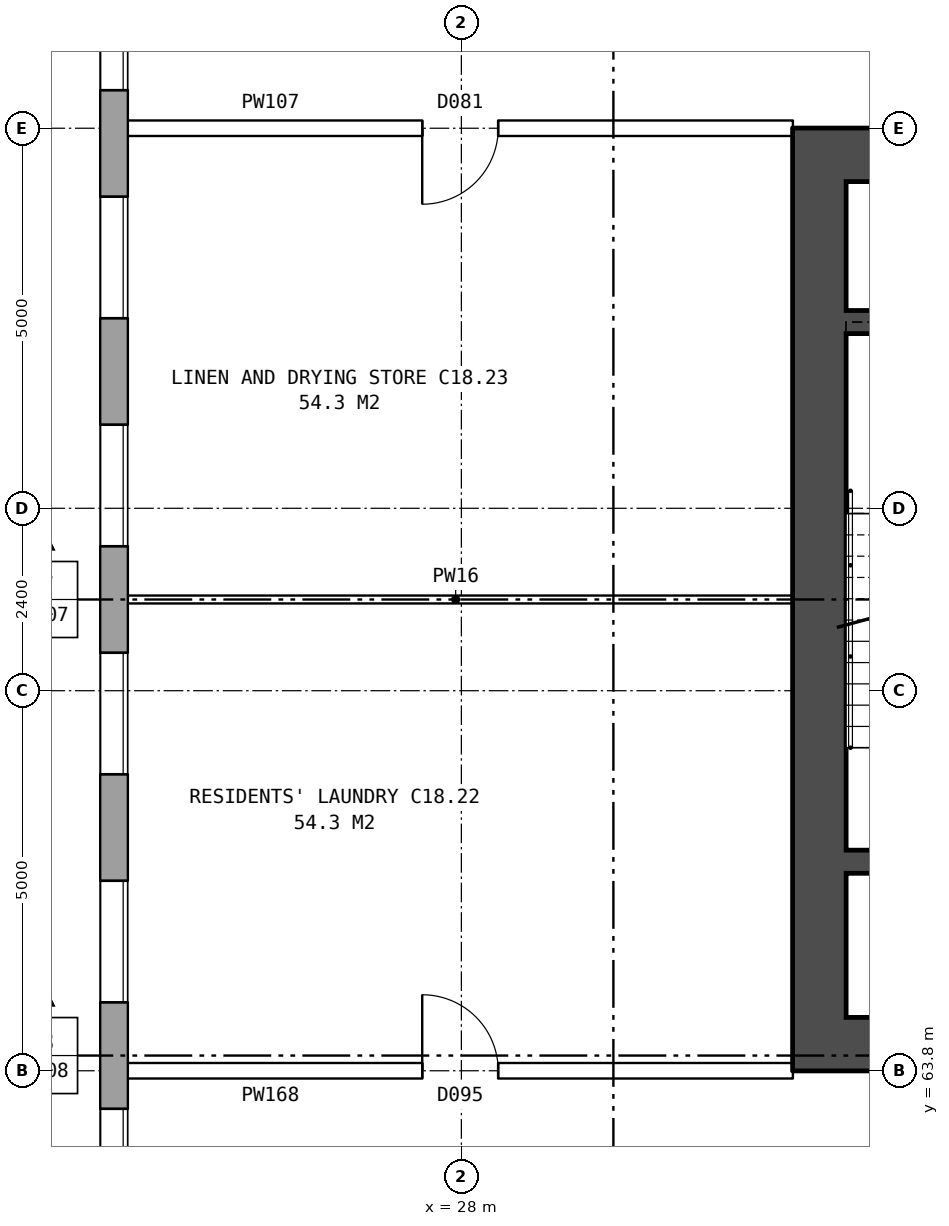
"""IFC4 building model, lengths in metres.
Left out: names, types, materials, properties, quantities, classifications, styles, units other than length and angle.
Written with IfcOpenShell. Run it as: python <this file> out.ifc"""

import sys

from ifc_helpers import new_model, si_unit, direction, frame, frame_2d, origin, place, context, subcontext, project, spatial, rectangle, extrude, element, fill, save


model = new_model("IFC4")
c1 = context("Model", 3, precision=1e-05, world=origin(), true_north=direction((0.0, 1.0)))
c2 = subcontext(c1, "Body", "Model", "MODEL_VIEW")
j1 = project(units=[si_unit("LENGTHUNIT", "METRE"), si_unit("PLANEANGLEUNIT", "RADIAN")], contexts=[c1])
p1 = place(None, origin())
s1 = spatial("IfcSite", under=j1, at=p1, CompositionType="ELEMENT")
p2 = place(p1, origin())
s2 = spatial("IfcBuilding", under=s1, at=p2, CompositionType="ELEMENT")
p3 = place(p2, frame((0.0, 0.0, 67.4)))
s3 = spatial("IfcBuildingStorey", under=s2, at=p3, CompositionType="ELEMENT", Elevation=67.4)
p4 = place(p3, frame((23.43, 82.925, 0.0), z_axis=(0.0, 0.0, 1.0), x_axis=(0.0, -1.0, 0.0)))
e1 = element("IfcWall", 1, at=p4, inside=s3, PredefinedType="STANDARD", context=c2, shape_type="SweptSolid", body=[
    extrude(rectangle(XDim=25.851, YDim=0.36, at=frame_2d((12.925, 0.0))), origin(), (0.0, 0.0, 1.0), 3.6),
])
p5 = place(p4, frame((1.625, 0.0, 0.8)))
e2 = element("IfcOpeningElement", 2, at=p5, cuts=e1, PredefinedType="OPENING", context=c2, shape_type="SweptSolid", body=[
    extrude(rectangle(XDim=1.6, YDim=1.8, at=frame_2d((0.8, 0.9))), frame((0.0, 0.19, 0.0), z_axis=(0.0, -1.0, 0.0), x_axis=(1.0, 0.0, 0.0)), (0.0, 0.0, 1.0), 0.38),
])
p6 = place(p4, frame((4.625, 0.0, 0.8)))
e3 = element("IfcOpeningElement", 3, at=p6, cuts=e1, PredefinedType="OPENING", context=c2, shape_type="SweptSolid", body=[
    extrude(rectangle(XDim=1.6, YDim=1.8, at=frame_2d((0.8, 0.9))), frame((0.0, 0.19, 0.0), z_axis=(0.0, -1.0, 0.0), x_axis=(1.0, 0.0, 0.0)), (0.0, 0.0, 1.0), 0.38),
])
p7 = place(p4, frame((7.625, 0.0, 0.8)))
e4 = element("IfcOpeningElement", 4, at=p7, cuts=e1, PredefinedType="OPENING", context=c2, shape_type="SweptSolid", body=[
    extrude(rectangle(XDim=1.6, YDim=1.8, at=frame_2d((0.8, 0.9))), frame((0.0, 0.19, 0.0), z_axis=(0.0, -1.0, 0.0), x_axis=(1.0, 0.0, 0.0)), (0.0, 0.0, 1.0), 0.38),
])
p8 = place(p4, frame((10.625, 0.0, 0.8)))
e5 = element("IfcOpeningElement", 5, at=p8, cuts=e1, PredefinedType="OPENING", context=c2, shape_type="SweptSolid", body=[
    extrude(rectangle(XDim=1.6, YDim=1.8, at=frame_2d((0.8, 0.9))), frame((0.0, 0.19, 0.0), z_axis=(0.0, -1.0, 0.0), x_axis=(1.0, 0.0, 0.0)), (0.0, 0.0, 1.0), 0.38),
])
p9 = place(p4, frame((13.625, 0.0, 0.8)))
e6 = element("IfcOpeningElement", 6, at=p9, cuts=e1, PredefinedType="OPENING", context=c2, shape_type="SweptSolid", body=[
    extrude(rectangle(XDim=1.6, YDim=1.8, at=frame_2d((0.8, 0.9))), frame((0.0, 0.19, 0.0), z_axis=(0.0, -1.0, 0.0), x_axis=(1.0, 0.0, 0.0)), (0.0, 0.0, 1.0), 0.38),
])
p10 = place(p4, frame((16.625, 0.0, 0.8)))
e7 = element("IfcOpeningElement", 7, at=p10, cuts=e1, PredefinedType="OPENING", context=c2, shape_type="SweptSolid", body=[
    extrude(rectangle(XDim=1.6, YDim=1.8, at=frame_2d((0.8, 0.9))), frame((0.0, 0.19, 0.0), z_axis=(0.0, -1.0, 0.0), x_axis=(1.0, 0.0, 0.0)), (0.0, 0.0, 1.0), 0.38),
])
p11 = place(p4, frame((19.625, 0.0, 0.8)))
e8 = element("IfcOpeningElement", 8, at=p11, cuts=e1, PredefinedType="OPENING", context=c2, shape_type="SweptSolid", body=[
    extrude(rectangle(XDim=1.6, YDim=1.8, at=frame_2d((0.8, 0.9))), frame((0.0, 0.19, 0.0), z_axis=(0.0, -1.0, 0.0), x_axis=(1.0, 0.0, 0.0)), (0.0, 0.0, 1.0), 0.38),
])
p12 = place(p4, frame((22.625, 0.0, 0.8)))
e9 = element("IfcOpeningElement", 9, at=p12, cuts=e1, PredefinedType="OPENING", context=c2, shape_type="SweptSolid", body=[
    extrude(rectangle(XDim=1.6, YDim=1.8, at=frame_2d((0.8, 0.9))), frame((0.0, 0.19, 0.0), z_axis=(0.0, -1.0, 0.0), x_axis=(1.0, 0.0, 0.0)), (0.0, 0.0, 1.0), 0.38),
])
p13 = place(p3, frame((32.71, 75.5, 0.0), z_axis=(0.0, 0.0, 1.0), x_axis=(0.0, -1.0, 0.0)))
e10 = element("IfcWall", 10, at=p13, inside=s3, PredefinedType="SHEAR", context=c2, shape_type="SweptSolid", body=[
    extrude(rectangle(XDim=11.0, YDim=0.7, at=frame_2d((5.5, 0.0))), origin(), (0.0, 0.0, 1.0), 3.6),
])
for number, where, z_axis, x_axis in (
    (11, (41.36, 75.85, 0.0), (0.0, 0.0, 1.0), (-1.0, 0.0, 0.0)),
    (12, (41.36, 64.15, 0.0), (0.0, 0.0, 1.0), (-1.0, 0.0, 0.0)),
):
    element("IfcWall", number, at=place(p3, frame(where, z_axis=z_axis, x_axis=x_axis)), inside=s3, PredefinedType="SHEAR", context=c2, shape_type="SweptSolid", body=[
        extrude(rectangle(XDim=9.0, YDim=0.7, at=frame_2d((4.5, 0.0))), origin(), (0.0, 0.0, 1.0), 3.6),
    ])
for number, where, z_axis, x_axis in (
    (13, (36.11, 73.65, 0.0), (0.0, 0.0, 1.0), (-1.0, 0.0, 0.0)),
    (14, (36.11, 66.55, 0.0), (0.0, 0.0, 1.0), (-1.0, 0.0, 0.0)),
):
    element("IfcWall", number, at=place(p3, frame(where, z_axis=z_axis, x_axis=x_axis)), inside=s3, PredefinedType="SHEAR", context=c2, shape_type="SweptSolid", body=[
        extrude(rectangle(XDim=3.05, YDim=0.3, at=frame_2d((1.525, 0.0))), origin(), (0.0, 0.0, 1.0), 3.6),
    ])
p14 = place(p3, frame((23.49, 63.8, 0.0), z_axis=(0.0, 0.0, 1.0), x_axis=(1.0, 0.0, 0.0)))
e15 = element("IfcWall", 15, at=p14, inside=s3, PredefinedType="PARTITIONING", context=c2, shape_type="SweptSolid", body=[
    extrude(rectangle(XDim=8.87, YDim=0.2, at=frame_2d((4.435, 0.0))), origin(), (0.0, 0.0, 1.0), 3.6),
])
p15 = place(p14, frame((3.995, 0.0, 0.0)))
e16 = element("IfcOpeningElement", 16, at=p15, cuts=e15, PredefinedType="OPENING", context=c2, shape_type="SweptSolid", body=[
    extrude(rectangle(XDim=1.0, YDim=2.1, at=frame_2d((0.5, 1.05))), frame((0.0, 0.11, 0.0), z_axis=(0.0, -1.0, 0.0), x_axis=(1.0, 0.0, 0.0)), (0.0, 0.0, 1.0), 0.22),
])
p16 = place(p3, frame((23.49, 70.0, 0.0), z_axis=(0.0, 0.0, 1.0), x_axis=(1.0, 0.0, 0.0)))
e17 = element("IfcWall", 17, at=p16, inside=s3, PredefinedType="PARTITIONING", context=c2, shape_type="SweptSolid", body=[
    extrude(rectangle(XDim=8.87, YDim=0.1, at=frame_2d((4.435, 0.0))), origin(), (0.0, 0.0, 1.0), 3.6),
])
p17 = place(p3, frame((23.49, 76.2, 0.0), z_axis=(0.0, 0.0, 1.0), x_axis=(1.0, 0.0, 0.0)))
e18 = element("IfcWall", 18, at=p17, inside=s3, PredefinedType="PARTITIONING", context=c2, shape_type="SweptSolid", body=[
    extrude(rectangle(XDim=8.87, YDim=0.2, at=frame_2d((4.435, 0.0))), origin(), (0.0, 0.0, 1.0), 3.6),
])
p18 = place(p17, frame((3.995, 0.0, 0.0)))
e19 = element("IfcOpeningElement", 19, at=p18, cuts=e18, PredefinedType="OPENING", context=c2, shape_type="SweptSolid", body=[
    extrude(rectangle(XDim=1.0, YDim=2.1, at=frame_2d((0.5, 1.05))), frame((0.0, 0.11, 0.0), z_axis=(0.0, -1.0, 0.0), x_axis=(1.0, 0.0, 0.0)), (0.0, 0.0, 1.0), 0.22),
])
p19 = place(p6, origin())
e20 = element("IfcWindow", 20, at=p19, inside=s3, PartitioningType="SINGLE_PANEL", PredefinedType="WINDOW", context=c2, shape_type="SweptSolid", body=[
    extrude(rectangle(XDim=1.6, YDim=1.8, at=frame_2d((0.8, 0.9))), frame((0.0, 0.15, 0.0), z_axis=(0.0, -1.0, 0.0), x_axis=(1.0, 0.0, 0.0)), (0.0, 0.0, 1.0), 0.06),
])
fill(e3, e20)
p20 = place(p7, origin())
e21 = element("IfcWindow", 21, at=p20, inside=s3, PartitioningType="SINGLE_PANEL", PredefinedType="WINDOW", context=c2, shape_type="SweptSolid", body=[
    extrude(rectangle(XDim=1.6, YDim=1.8, at=frame_2d((0.8, 0.9))), frame((0.0, 0.15, 0.0), z_axis=(0.0, -1.0, 0.0), x_axis=(1.0, 0.0, 0.0)), (0.0, 0.0, 1.0), 0.06),
])
fill(e4, e21)
p21 = place(p8, origin())
e22 = element("IfcWindow", 22, at=p21, inside=s3, PartitioningType="SINGLE_PANEL", PredefinedType="WINDOW", context=c2, shape_type="SweptSolid", body=[
    extrude(rectangle(XDim=1.6, YDim=1.8, at=frame_2d((0.8, 0.9))), frame((0.0, 0.15, 0.0), z_axis=(0.0, -1.0, 0.0), x_axis=(1.0, 0.0, 0.0)), (0.0, 0.0, 1.0), 0.06),
])
fill(e5, e22)
p22 = place(p9, origin())
e23 = element("IfcWindow", 23, at=p22, inside=s3, PartitioningType="SINGLE_PANEL", PredefinedType="WINDOW", context=c2, shape_type="SweptSolid", body=[
    extrude(rectangle(XDim=1.6, YDim=1.8, at=frame_2d((0.8, 0.9))), frame((0.0, 0.15, 0.0), z_axis=(0.0, -1.0, 0.0), x_axis=(1.0, 0.0, 0.0)), (0.0, 0.0, 1.0), 0.06),
])
fill(e6, e23)
p23 = place(p10, origin())
e24 = element("IfcWindow", 24, at=p23, inside=s3, PartitioningType="SINGLE_PANEL", PredefinedType="WINDOW", context=c2, shape_type="SweptSolid", body=[
    extrude(rectangle(XDim=1.6, YDim=1.8, at=frame_2d((0.8, 0.9))), frame((0.0, 0.15, 0.0), z_axis=(0.0, -1.0, 0.0), x_axis=(1.0, 0.0, 0.0)), (0.0, 0.0, 1.0), 0.06),
])
fill(e7, e24)
p24 = place(p11, origin())
e25 = element("IfcWindow", 25, at=p24, inside=s3, PartitioningType="SINGLE_PANEL", PredefinedType="WINDOW", context=c2, shape_type="SweptSolid", body=[
    extrude(rectangle(XDim=1.6, YDim=1.8, at=frame_2d((0.8, 0.9))), frame((0.0, 0.15, 0.0), z_axis=(0.0, -1.0, 0.0), x_axis=(1.0, 0.0, 0.0)), (0.0, 0.0, 1.0), 0.06),
])
fill(e8, e25)
p25 = place(p15, origin())
e26 = element("IfcDoor", 26, at=p25, inside=s3, OperationType="SINGLE_SWING_LEFT", PredefinedType="DOOR", context=c2, shape_type="SweptSolid", body=[
    extrude(rectangle(XDim=1.0, YDim=2.1, at=frame_2d((0.5, 1.05))), frame((0.0, 0.025, 0.0), z_axis=(0.0, -1.0, 0.0), x_axis=(1.0, 0.0, 0.0)), (0.0, 0.0, 1.0), 0.05),
])
fill(e16, e26)
p26 = place(p18, frame((1.0, 0.0, 0.0), z_axis=(0.0, 0.0, 1.0), x_axis=(-1.0, 0.0, 0.0)))
e27 = element("IfcDoor", 27, at=p26, inside=s3, OperationType="SINGLE_SWING_RIGHT", PredefinedType="DOOR", context=c2, shape_type="SweptSolid", body=[
    extrude(rectangle(XDim=1.0, YDim=2.1, at=frame_2d((0.5, 1.05))), frame((0.0, 0.025, 0.0), z_axis=(0.0, -1.0, 0.0), x_axis=(1.0, 0.0, 0.0)), (0.0, 0.0, 1.0), 0.05),
])
fill(e19, e27)
save(model, sys.argv[1])
